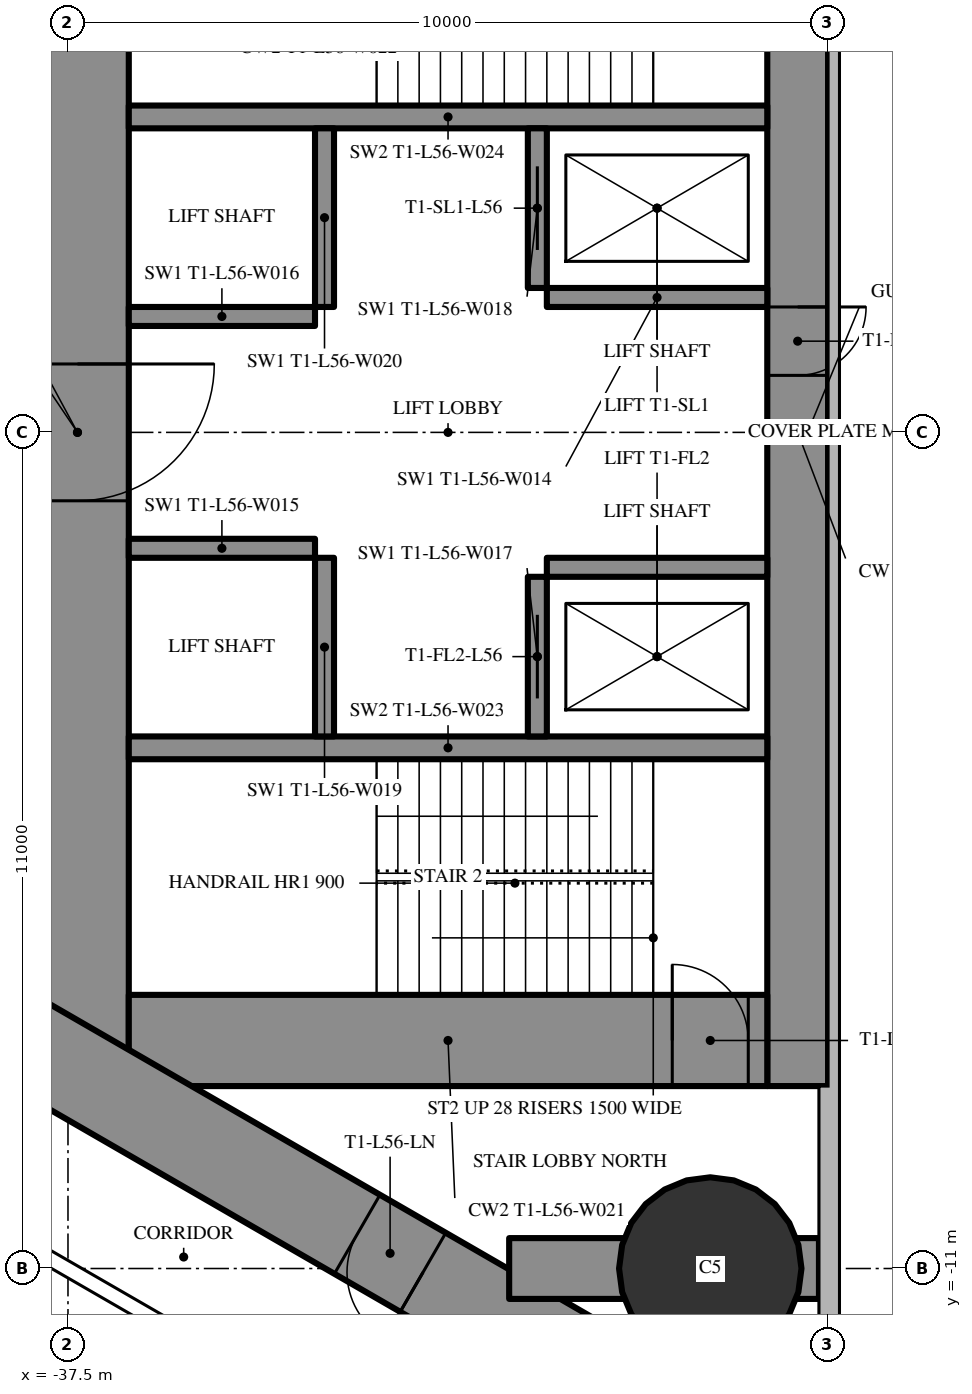
"""IFC4 building model, lengths in metres.
Left out: names, types, materials, properties, quantities, classifications, styles, units other than length and angle.
Written with IfcOpenShell. Run it as: python <this file> out.ifc"""

import sys

from ifc_helpers import new_model, si_unit, direction, frame, frame_2d, origin, origin_2d, place, context, subcontext, project, spatial, rectangle, hollow_circle, extrude, element, fill, save


model = new_model("IFC4")
c1 = context("Model", 3, precision=1e-05, world=origin(), true_north=direction((0.0, 1.0)))
c2 = subcontext(c1, "Body", "Model", "MODEL_VIEW")
j1 = project(units=[si_unit("LENGTHUNIT", "METRE"), si_unit("PLANEANGLEUNIT", "RADIAN")], contexts=[c1])
p1 = place(None, origin())
s1 = spatial("IfcSite", under=j1, at=p1, CompositionType="ELEMENT")
p2 = place(p1, origin())
s2 = spatial("IfcBuilding", under=s1, at=p2, CompositionType="ELEMENT")
p3 = place(p2, frame((0.0, 0.0, 210.3)))
s3 = spatial("IfcBuildingStorey", under=s2, at=p3, CompositionType="ELEMENT", Elevation=210.3)
p4 = place(p3, frame((-29.05, -11.0, 0.0), z_axis=(0.0, 0.0, 1.0), x_axis=(1.0, 0.0, 0.0)))
e1 = element("IfcColumn", 1, at=p4, inside=s3, PredefinedType="COLUMN", context=c2, shape_type="SweptSolid", body=[
    extrude(hollow_circle(Radius=1.2, WallThickness=0.09, at=origin_2d()), origin(), (0.0, 0.0, 1.0), 5.0),
])
p5 = place(p3, frame((-27.9, 8.6, 0.0), z_axis=(0.0, 0.0, 1.0), x_axis=(0.0, -1.0, 0.0)))
e2 = element("IfcWall", 2, at=p5, inside=s3, PredefinedType="SHEAR", context=c2, shape_type="SweptSolid", body=[
    extrude(rectangle(XDim=17.2, YDim=0.8, at=frame_2d((8.6, 0.0))), origin(), (0.0, 0.0, 1.0), 5.0),
])
p6 = place(p5, frame((6.95, 0.0, 0.0)))
e3 = element("IfcOpeningElement", 3, at=p6, cuts=e2, PredefinedType="OPENING", context=c2, shape_type="SweptSolid", body=[
    extrude(rectangle(XDim=0.9, YDim=2.2, at=frame_2d((0.45, 1.1))), frame((0.0, 0.41, 0.0), z_axis=(0.0, -1.0, 0.0), x_axis=(1.0, 0.0, 0.0)), (0.0, 0.0, 1.0), 0.82),
])
p7 = place(p3, frame((-37.375, 8.6, 0.0), z_axis=(0.0, 0.0, 1.0), x_axis=(0.0, -1.0, 0.0)))
e4 = element("IfcWall", 4, at=p7, inside=s3, PredefinedType="SHEAR", context=c2, shape_type="SweptSolid", body=[
    extrude(rectangle(XDim=17.2, YDim=1.35, at=frame_2d((8.6, 0.0))), origin(), (0.0, 0.0, 1.0), 5.0),
])
p8 = place(p7, frame((7.7, 0.0, 0.0)))
e5 = element("IfcOpeningElement", 5, at=p8, cuts=e4, PredefinedType="OPENING", context=c2, shape_type="SweptSolid", body=[
    extrude(rectangle(XDim=1.8, YDim=2.2, at=frame_2d((0.9, 1.1))), frame((0.0, 0.685, 0.0), z_axis=(0.0, -1.0, 0.0), x_axis=(1.0, 0.0, 0.0)), (0.0, 0.0, 1.0), 1.37),
])
p9 = place(p3, frame((-28.3, -8.0, 0.0), z_axis=(0.0, 0.0, 1.0), x_axis=(-1.0, 0.0, 0.0)))
e6 = element("IfcWall", 6, at=p9, inside=s3, PredefinedType="SHEAR", context=c2, shape_type="SweptSolid", body=[
    extrude(rectangle(XDim=8.4, YDim=1.2, at=frame_2d((4.2, 0.0))), origin(), (0.0, 0.0, 1.0), 5.0),
])
p10 = place(p9, frame((0.25, 0.0, 0.0)))
e7 = element("IfcOpeningElement", 7, at=p10, cuts=e6, PredefinedType="OPENING", context=c2, shape_type="SweptSolid", body=[
    extrude(rectangle(XDim=1.0, YDim=2.2, at=frame_2d((0.5, 1.1))), frame((0.0, 0.61, 0.0), z_axis=(0.0, -1.0, 0.0), x_axis=(1.0, 0.0, 0.0)), (0.0, 0.0, 1.0), 1.22),
])
for number, where, z_axis, x_axis in (
    (8, (-28.3, 4.15, 0.0), (0.0, 0.0, 1.0), (-1.0, 0.0, 0.0)),
    (9, (-28.3, -4.15, 0.0), (0.0, 0.0, 1.0), (-1.0, 0.0, 0.0)),
):
    element("IfcWall", number, at=place(p3, frame(where, z_axis=z_axis, x_axis=x_axis)), inside=s3, PredefinedType="SHEAR", context=c2, shape_type="SweptSolid", body=[
        extrude(rectangle(XDim=8.4, YDim=0.3, at=frame_2d((4.2, 0.0))), origin(), (0.0, 0.0, 1.0), 5.0),
    ])
p11 = place(p3, frame((-31.325, 4.0, 0.0), z_axis=(0.0, 0.0, 1.0), x_axis=(0.0, -1.0, 0.0)))
e10 = element("IfcWall", 10, at=p11, inside=s3, PredefinedType="SHEAR", context=c2, shape_type="SweptSolid", body=[
    extrude(rectangle(XDim=2.1, YDim=0.25, at=frame_2d((1.05, 0.0))), origin(), (0.0, 0.0, 1.0), 5.0),
])
p12 = place(p11, frame((0.5, 0.0, 0.0)))
e11 = element("IfcOpeningElement", 11, at=p12, cuts=e10, PredefinedType="OPENING", context=c2, shape_type="SweptSolid", body=[
    extrude(rectangle(XDim=1.1, YDim=2.2, at=frame_2d((0.55, 1.1))), frame((0.0, 0.135, 0.0), z_axis=(0.0, -1.0, 0.0), x_axis=(1.0, 0.0, 0.0)), (0.0, 0.0, 1.0), 0.27),
])
p13 = place(p3, frame((-34.125, 4.0, 0.0), z_axis=(0.0, 0.0, 1.0), x_axis=(0.0, -1.0, 0.0)))
e12 = element("IfcWall", 12, at=p13, inside=s3, PredefinedType="SHEAR", context=c2, shape_type="SweptSolid", body=[
    extrude(rectangle(XDim=2.35, YDim=0.25, at=frame_2d((1.175, 0.0))), origin(), (0.0, 0.0, 1.0), 5.0),
])
p14 = place(p3, frame((-28.3, 1.775, 0.0), z_axis=(0.0, 0.0, 1.0), x_axis=(-1.0, 0.0, 0.0)))
e13 = element("IfcWall", 13, at=p14, inside=s3, PredefinedType="SHEAR", context=c2, shape_type="SweptSolid", body=[
    extrude(rectangle(XDim=2.9, YDim=0.25, at=frame_2d((1.45, 0.0))), origin(), (0.0, 0.0, 1.0), 5.0),
])
p15 = place(p3, frame((-34.25, 1.525, 0.0), z_axis=(0.0, 0.0, 1.0), x_axis=(-1.0, 0.0, 0.0)))
e14 = element("IfcWall", 14, at=p15, inside=s3, PredefinedType="SHEAR", context=c2, shape_type="SweptSolid", body=[
    extrude(rectangle(XDim=2.45, YDim=0.25, at=frame_2d((1.225, 0.0))), origin(), (0.0, 0.0, 1.0), 5.0),
])
p16 = place(p3, frame((-31.325, -1.9, 0.0), z_axis=(0.0, 0.0, 1.0), x_axis=(0.0, -1.0, 0.0)))
e15 = element("IfcWall", 15, at=p16, inside=s3, PredefinedType="SHEAR", context=c2, shape_type="SweptSolid", body=[
    extrude(rectangle(XDim=2.1, YDim=0.25, at=frame_2d((1.05, 0.0))), origin(), (0.0, 0.0, 1.0), 5.0),
])
p17 = place(p16, frame((0.5, 0.0, 0.0)))
e16 = element("IfcOpeningElement", 16, at=p17, cuts=e15, PredefinedType="OPENING", context=c2, shape_type="SweptSolid", body=[
    extrude(rectangle(XDim=1.1, YDim=2.2, at=frame_2d((0.55, 1.1))), frame((0.0, 0.135, 0.0), z_axis=(0.0, -1.0, 0.0), x_axis=(1.0, 0.0, 0.0)), (0.0, 0.0, 1.0), 0.27),
])
p18 = place(p3, frame((-34.125, -1.65, 0.0), z_axis=(0.0, 0.0, 1.0), x_axis=(0.0, -1.0, 0.0)))
e17 = element("IfcWall", 17, at=p18, inside=s3, PredefinedType="SHEAR", context=c2, shape_type="SweptSolid", body=[
    extrude(rectangle(XDim=2.35, YDim=0.25, at=frame_2d((1.175, 0.0))), origin(), (0.0, 0.0, 1.0), 5.0),
])
p19 = place(p3, frame((-28.3, -1.775, 0.0), z_axis=(0.0, 0.0, 1.0), x_axis=(-1.0, 0.0, 0.0)))
e18 = element("IfcWall", 18, at=p19, inside=s3, PredefinedType="SHEAR", context=c2, shape_type="SweptSolid", body=[
    extrude(rectangle(XDim=2.9, YDim=0.25, at=frame_2d((1.45, 0.0))), origin(), (0.0, 0.0, 1.0), 5.0),
])
p20 = place(p3, frame((-34.25, -1.525, 0.0), z_axis=(0.0, 0.0, 1.0), x_axis=(-1.0, 0.0, 0.0)))
e19 = element("IfcWall", 19, at=p20, inside=s3, PredefinedType="SHEAR", context=c2, shape_type="SweptSolid", body=[
    extrude(rectangle(XDim=2.45, YDim=0.25, at=frame_2d((1.225, 0.0))), origin(), (0.0, 0.0, 1.0), 5.0),
])
p21 = place(p3, frame((-27.2, 14.3, 0.0), z_axis=(0.0, 0.0, 1.0), x_axis=(-0.866026593062, -0.499997940104, 0.0)))
e20 = element("IfcWall", 20, at=p21, inside=s3, PredefinedType="SHEAR", context=c2, shape_type="SweptSolid", body=[
    extrude(rectangle(XDim=28.946, YDim=1.2, at=frame_2d((14.473, 0.0))), origin(), (0.0, 0.0, 1.0), 5.0),
])
p22 = place(p21, frame((6.5, 0.0, 0.0)))
e21 = element("IfcOpeningElement", 21, at=p22, cuts=e20, PredefinedType="OPENING", context=c2, shape_type="SweptSolid", body=[
    extrude(rectangle(XDim=1.0, YDim=2.2, at=frame_2d((0.5, 1.1))), frame((0.0, 0.61, 0.0), z_axis=(0.0, -1.0, 0.0), x_axis=(1.0, 0.0, 0.0)), (0.0, 0.0, 1.0), 1.22),
])
p23 = place(p21, frame((13.568, 0.0, 0.0)))
e22 = element("IfcOpeningElement", 22, at=p23, cuts=e20, PredefinedType="OPENING", context=c2, shape_type="SweptSolid", body=[
    extrude(rectangle(XDim=1.8, YDim=2.2, at=frame_2d((0.9, 1.1))), frame((0.0, 0.61, 0.0), z_axis=(0.0, -1.0, 0.0), x_axis=(1.0, 0.0, 0.0)), (0.0, 0.0, 1.0), 1.22),
])
p24 = place(p3, frame((-27.2, -14.3, 0.0), z_axis=(0.0, 0.0, 1.0), x_axis=(-0.866024021859, 0.500002393557, 0.0)))
e23 = element("IfcWall", 23, at=p24, inside=s3, PredefinedType="SHEAR", context=c2, shape_type="SweptSolid", body=[
    extrude(rectangle(XDim=27.907, YDim=1.2, at=frame_2d((13.954, 0.0))), origin(), (0.0, 0.0, 1.0), 5.0),
])
p25 = place(p24, frame((6.5, 0.0, 0.0)))
e24 = element("IfcOpeningElement", 24, at=p25, cuts=e23, PredefinedType="OPENING", context=c2, shape_type="SweptSolid", body=[
    extrude(rectangle(XDim=1.0, YDim=2.2, at=frame_2d((0.5, 1.1))), frame((0.0, 0.61, 0.0), z_axis=(0.0, -1.0, 0.0), x_axis=(1.0, 0.0, 0.0)), (0.0, 0.0, 1.0), 1.22),
])
p26 = place(p24, frame((13.568, 0.0, 0.0)))
e25 = element("IfcOpeningElement", 25, at=p26, cuts=e23, PredefinedType="OPENING", context=c2, shape_type="SweptSolid", body=[
    extrude(rectangle(XDim=1.8, YDim=2.2, at=frame_2d((0.9, 1.1))), frame((0.0, 0.61, 0.0), z_axis=(0.0, -1.0, 0.0), x_axis=(1.0, 0.0, 0.0)), (0.0, 0.0, 1.0), 1.22),
])
p27 = place(p3, frame((-27.62, -11.0, 0.0), z_axis=(0.0, 0.0, 1.0), x_axis=(-1.0, 0.0, 0.0)))
e26 = element("IfcWall", 26, at=p27, inside=s3, PredefinedType="SHEAR", context=c2, shape_type="SweptSolid", body=[
    extrude(rectangle(XDim=4.076, YDim=0.8, at=frame_2d((2.038, 0.0))), origin(), (0.0, 0.0, 1.0), 5.0),
])
p28 = place(p3, frame((-28.737, 16.068, 0.0), z_axis=(0.0, 0.0, 1.0), x_axis=(-0.866026057212, -0.499998868229, 0.0)))
e27 = element("IfcWall", 27, at=p28, inside=s3, PredefinedType="PARTITIONING", context=c2, shape_type="SweptSolid", body=[
    extrude(rectangle(XDim=32.137, YDim=0.2, at=frame_2d((16.068, 0.0))), origin(), (0.0, 0.0, 1.0), 4.75),
])
p29 = place(p28, frame((7.134, 0.0, 0.0)))
e28 = element("IfcOpeningElement", 28, at=p29, cuts=e27, PredefinedType="OPENING", context=c2, shape_type="SweptSolid", body=[
    extrude(rectangle(XDim=2.0, YDim=2.4, at=frame_2d((1.0, 1.2))), frame((0.0, 0.11, 0.0), z_axis=(0.0, -1.0, 0.0), x_axis=(1.0, 0.0, 0.0)), (0.0, 0.0, 1.0), 0.22),
])
p30 = place(p28, frame((16.776, 0.0, 0.0)))
e29 = element("IfcOpeningElement", 29, at=p30, cuts=e27, PredefinedType="OPENING", context=c2, shape_type="SweptSolid", body=[
    extrude(rectangle(XDim=1.8, YDim=2.2, at=frame_2d((0.9, 1.1))), frame((0.0, 0.11, 0.0), z_axis=(0.0, -1.0, 0.0), x_axis=(1.0, 0.0, 0.0)), (0.0, 0.0, 1.0), 0.22),
])
p31 = place(p28, frame((21.799, 0.0, 0.0)))
e30 = element("IfcOpeningElement", 30, at=p31, cuts=e27, PredefinedType="OPENING", context=c2, shape_type="SweptSolid", body=[
    extrude(rectangle(XDim=1.8, YDim=2.2, at=frame_2d((0.9, 1.1))), frame((0.0, 0.11, 0.0), z_axis=(0.0, -1.0, 0.0), x_axis=(1.0, 0.0, 0.0)), (0.0, 0.0, 1.0), 0.22),
])
p32 = place(p28, frame((26.575, 0.0, 0.0)))
e31 = element("IfcOpeningElement", 31, at=p32, cuts=e27, PredefinedType="OPENING", context=c2, shape_type="SweptSolid", body=[
    extrude(rectangle(XDim=1.8, YDim=2.2, at=frame_2d((0.9, 1.1))), frame((0.0, 0.11, 0.0), z_axis=(0.0, -1.0, 0.0), x_axis=(1.0, 0.0, 0.0)), (0.0, 0.0, 1.0), 0.22),
])
p33 = place(p3, frame((-28.737, -16.068, 0.0), z_axis=(0.0, 0.0, 1.0), x_axis=(-0.866029399323, 0.49999307946, 0.0)))
e32 = element("IfcWall", 32, at=p33, inside=s3, PredefinedType="PARTITIONING", context=c2, shape_type="SweptSolid", body=[
    extrude(rectangle(XDim=11.61, YDim=0.2, at=frame_2d((5.805, 0.0))), origin(), (0.0, 0.0, 1.0), 4.75),
])
p34 = place(p33, frame((4.905, 0.0, 0.0)))
e33 = element("IfcOpeningElement", 33, at=p34, cuts=e32, PredefinedType="OPENING", context=c2, shape_type="SweptSolid", body=[
    extrude(rectangle(XDim=1.8, YDim=2.2, at=frame_2d((0.9, 1.1))), frame((0.0, 0.11, 0.0), z_axis=(0.0, -1.0, 0.0), x_axis=(1.0, 0.0, 0.0)), (0.0, 0.0, 1.0), 0.22),
])
p35 = place(p25, origin())
e34 = element("IfcDoor", 34, at=p35, inside=s3, OperationType="SINGLE_SWING_LEFT", PredefinedType="DOOR", context=c2, shape_type="SweptSolid", body=[
    extrude(rectangle(XDim=1.0, YDim=2.2, at=frame_2d((0.5, 1.1))), frame((0.0, 0.025, 0.0), z_axis=(0.0, -1.0, 0.0), x_axis=(1.0, 0.0, 0.0)), (0.0, 0.0, 1.0), 0.05),
])
fill(e24, e34)
p36 = place(p8, origin())
e35 = element("IfcDoor", 35, at=p36, inside=s3, OperationType="DOUBLE_DOOR_SINGLE_SWING", PredefinedType="DOOR", context=c2, shape_type="SweptSolid", body=[
    extrude(rectangle(XDim=1.8, YDim=2.2, at=frame_2d((0.9, 1.1))), frame((0.0, 0.025, 0.0), z_axis=(0.0, -1.0, 0.0), x_axis=(1.0, 0.0, 0.0)), (0.0, 0.0, 1.0), 0.05),
])
fill(e5, e35)
p37 = place(p10, origin())
e36 = element("IfcDoor", 36, at=p37, inside=s3, OperationType="SINGLE_SWING_RIGHT", PredefinedType="DOOR", context=c2, shape_type="SweptSolid", body=[
    extrude(rectangle(XDim=1.0, YDim=2.2, at=frame_2d((0.5, 1.1))), frame((0.0, 0.025, 0.0), z_axis=(0.0, -1.0, 0.0), x_axis=(1.0, 0.0, 0.0)), (0.0, 0.0, 1.0), 0.05),
])
fill(e7, e36)
p38 = place(p6, origin())
e37 = element("IfcDoor", 37, at=p38, inside=s3, OperationType="SINGLE_SWING_LEFT", PredefinedType="DOOR", context=c2, shape_type="SweptSolid", body=[
    extrude(rectangle(XDim=0.9, YDim=2.2, at=frame_2d((0.45, 1.1))), frame((0.0, 0.025, 0.0), z_axis=(0.0, -1.0, 0.0), x_axis=(1.0, 0.0, 0.0)), (0.0, 0.0, 1.0), 0.05),
])
fill(e3, e37)
p39 = place(p12, origin())
e38 = element("IfcDoor", 38, at=p39, inside=s3, OperationType="SLIDING_TO_LEFT", PredefinedType="USERDEFINED", context=c2, shape_type="SweptSolid", body=[
    extrude(rectangle(XDim=1.1, YDim=2.2, at=frame_2d((0.55, 1.1))), frame((0.0, 0.025, 0.0), z_axis=(0.0, -1.0, 0.0), x_axis=(1.0, 0.0, 0.0)), (0.0, 0.0, 1.0), 0.05),
])
fill(e11, e38)
p40 = place(p17, origin())
e39 = element("IfcDoor", 39, at=p40, inside=s3, OperationType="SLIDING_TO_LEFT", PredefinedType="USERDEFINED", context=c2, shape_type="SweptSolid", body=[
    extrude(rectangle(XDim=1.1, YDim=2.2, at=frame_2d((0.55, 1.1))), frame((0.0, 0.025, 0.0), z_axis=(0.0, -1.0, 0.0), x_axis=(1.0, 0.0, 0.0)), (0.0, 0.0, 1.0), 0.05),
])
fill(e16, e39)
save(model, sys.argv[1])
